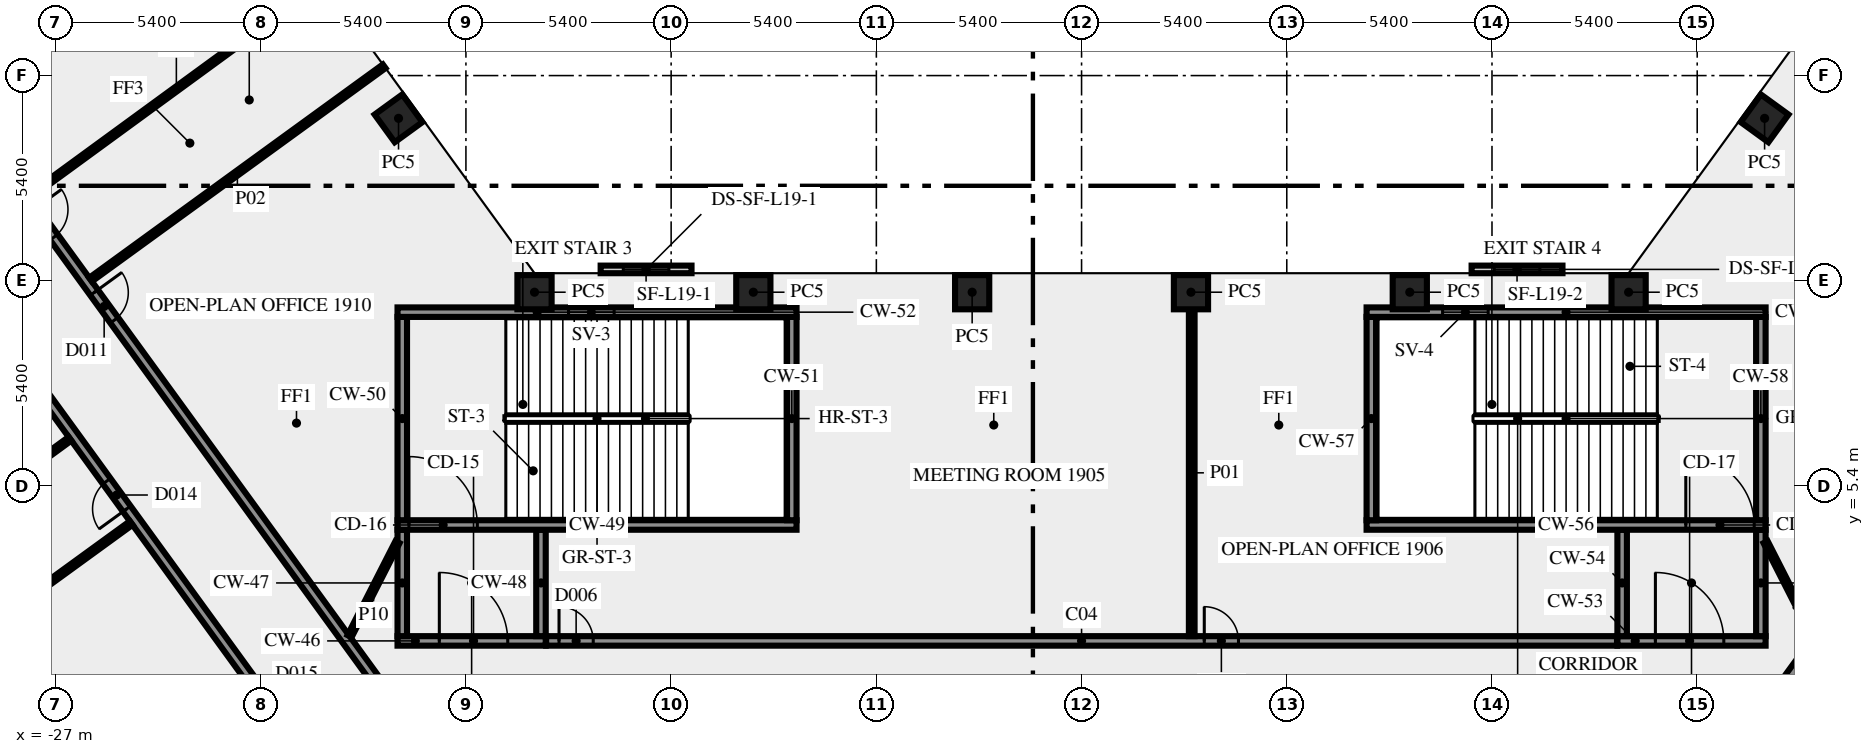
"""IFC4 building model, lengths in metres.
Left out: names, types, materials, properties, quantities, classifications, styles, units other than length and angle.
Written with IfcOpenShell. Run it as: python <this file> out.ifc"""

import sys

from ifc_helpers import new_model, si_unit, direction, frame, frame_2d, origin, origin_2d, place, context, subcontext, project, spatial, rectangle, extrude, element, fill, save


model = new_model("IFC4")
c1 = context("Model", 3, precision=1e-05, world=origin(), true_north=direction((0.0, 1.0)))
c2 = subcontext(c1, "Body", "Model", "MODEL_VIEW")
j1 = project(units=[si_unit("LENGTHUNIT", "METRE"), si_unit("PLANEANGLEUNIT", "RADIAN")], contexts=[c1])
p1 = place(None, origin())
s1 = spatial("IfcSite", under=j1, at=p1, CompositionType="ELEMENT")
p2 = place(p1, origin())
s2 = spatial("IfcBuilding", under=s1, at=p2, CompositionType="ELEMENT")
p3 = place(p2, frame((0.0, 0.0, 85.0)))
s3 = spatial("IfcBuildingStorey", under=s2, at=p3, CompositionType="ELEMENT", Elevation=85.0)
for number, where, z_axis, x_axis in (
    (1, (-17.974, 15.075, 0.0), (0.0, 0.0, 1.0), (-0.588, 0.809, 0.0)),
    (2, (17.974, 15.075, 0.0), (0.0, 0.0, 1.0), (-0.588, -0.809, 0.0)),
    (3, (14.395, 10.5, 0.0), (0.0, 0.0, 1.0), (-1.0, 0.0, 0.0)),
    (4, (8.637, 10.5, 0.0), (0.0, 0.0, 1.0), (-1.0, 0.0, 0.0)),
    (5, (2.879, 10.5, 0.0), (0.0, 0.0, 1.0), (-1.0, 0.0, 0.0)),
    (6, (-2.879, 10.5, 0.0), (0.0, 0.0, 1.0), (-1.0, 0.0, 0.0)),
    (7, (-8.637, 10.5, 0.0), (0.0, 0.0, 1.0), (-1.0, 0.0, 0.0)),
    (8, (-14.395, 10.5, 0.0), (0.0, 0.0, 1.0), (-1.0, 0.0, 0.0)),
):
    element("IfcColumn", number, at=place(p3, frame(where, z_axis=z_axis, x_axis=x_axis)), inside=s3, PredefinedType="COLUMN", context=c2, shape_type="SweptSolid", body=[
        extrude(rectangle(XDim=0.9, YDim=0.9, at=origin_2d()), origin(), (0.0, 0.0, 1.0), 3.65),
    ])
p4 = place(p3, frame((12.655, 11.1, 0.0), z_axis=(0.0, 0.0, 1.0), x_axis=(-1.0, 0.0, 0.0)))
e9 = element("IfcWall", 9, at=p4, inside=s3, PredefinedType="SOLIDWALL", context=c2, shape_type="SweptSolid", body=[
    extrude(rectangle(XDim=2.392, YDim=0.2, at=frame_2d((1.196, 0.0))), origin(), (0.0, 0.0, 1.0), 3.65),
])
p5 = place(p4, frame((0.596, 0.0, 1.0)))
e10 = element("IfcOpeningElement", 10, at=p5, cuts=e9, PredefinedType="OPENING", context=c2, shape_type="SweptSolid", body=[
    extrude(rectangle(XDim=1.2, YDim=1.2, at=frame_2d((0.6, 0.6))), frame((0.0, 0.11, 0.0), z_axis=(0.0, -1.0, 0.0), x_axis=(1.0, 0.0, 0.0)), (0.0, 0.0, 1.0), 0.22),
])
p6 = place(p3, frame((-10.263, 11.1, 0.0), z_axis=(0.0, 0.0, 1.0), x_axis=(-1.0, 0.0, 0.0)))
e11 = element("IfcWall", 11, at=p6, inside=s3, PredefinedType="SOLIDWALL", context=c2, shape_type="SweptSolid", body=[
    extrude(rectangle(XDim=2.392, YDim=0.2, at=frame_2d((1.196, 0.0))), origin(), (0.0, 0.0, 1.0), 3.65),
])
p7 = place(p6, frame((0.596, 0.0, 1.0)))
e12 = element("IfcOpeningElement", 12, at=p7, cuts=e11, PredefinedType="OPENING", context=c2, shape_type="SweptSolid", body=[
    extrude(rectangle(XDim=1.2, YDim=1.2, at=frame_2d((0.6, 0.6))), frame((0.0, 0.11, 0.0), z_axis=(0.0, -1.0, 0.0), x_axis=(1.0, 0.0, 0.0)), (0.0, 0.0, 1.0), 0.22),
])
p8 = place(p3, frame((-18.0, 1.325, 0.0), z_axis=(0.0, 0.0, 1.0), x_axis=(1.0, 0.0, 0.0)))
e13 = element("IfcWall", 13, at=p8, inside=s3, PredefinedType="SHEAR", context=c2, shape_type="SweptSolid", body=[
    extrude(rectangle(XDim=3.9, YDim=0.25, at=frame_2d((1.95, 0.0))), origin(), (0.0, 0.0, 1.0), 3.65),
])
p9 = place(p8, frame((1.1, 0.0, 0.0)))
e14 = element("IfcOpeningElement", 14, at=p9, cuts=e13, PredefinedType="OPENING", context=c2, shape_type="SweptSolid", body=[
    extrude(rectangle(XDim=1.8, YDim=2.1, at=frame_2d((0.9, 1.05))), frame((0.0, 0.135, 0.0), z_axis=(0.0, -1.0, 0.0), x_axis=(1.0, 0.0, 0.0)), (0.0, 0.0, 1.0), 0.27),
])
for number, where, z_axis, x_axis in (
    (15, (-17.875, 1.45, 0.0), (0.0, 0.0, 1.0), (0.0, 1.0, 0.0)),
    (16, (-14.225, 1.45, 0.0), (0.0, 0.0, 1.0), (0.0, 1.0, 0.0)),
):
    element("IfcWall", number, at=place(p3, frame(where, z_axis=z_axis, x_axis=x_axis)), inside=s3, PredefinedType="SHEAR", context=c2, shape_type="SweptSolid", body=[
        extrude(rectangle(XDim=2.8, YDim=0.25, at=frame_2d((1.4, 0.0))), origin(), (0.0, 0.0, 1.0), 3.65),
    ])
p10 = place(p3, frame((-18.0, 4.375, 0.0), z_axis=(0.0, 0.0, 1.0), x_axis=(1.0, 0.0, 0.0)))
e17 = element("IfcWall", 17, at=p10, inside=s3, PredefinedType="SHEAR", context=c2, shape_type="SweptSolid", body=[
    extrude(rectangle(XDim=10.5, YDim=0.25, at=frame_2d((5.25, 0.0))), origin(), (0.0, 0.0, 1.0), 3.65),
])
p11 = place(p10, frame((0.3, 0.0, 0.0)))
e18 = element("IfcOpeningElement", 18, at=p11, cuts=e17, PredefinedType="OPENING", context=c2, shape_type="SweptSolid", body=[
    extrude(rectangle(XDim=1.8, YDim=2.1, at=frame_2d((0.9, 1.05))), frame((0.0, 0.135, 0.0), z_axis=(0.0, -1.0, 0.0), x_axis=(1.0, 0.0, 0.0)), (0.0, 0.0, 1.0), 0.27),
])
for number, where, z_axis, x_axis in (
    (19, (-17.875, 4.5, 0.0), (0.0, 0.0, 1.0), (0.0, 1.0, 0.0)),
    (20, (-7.625, 4.5, 0.0), (0.0, 0.0, 1.0), (0.0, 1.0, 0.0)),
):
    element("IfcWall", number, at=place(p3, frame(where, z_axis=z_axis, x_axis=x_axis)), inside=s3, PredefinedType="SHEAR", context=c2, shape_type="SweptSolid", body=[
        extrude(rectangle(XDim=5.35, YDim=0.25, at=frame_2d((2.675, 0.0))), origin(), (0.0, 0.0, 1.0), 3.65),
    ])
p12 = place(p3, frame((-18.0, 9.975, 0.0), z_axis=(0.0, 0.0, 1.0), x_axis=(1.0, 0.0, 0.0)))
e21 = element("IfcWall", 21, at=p12, inside=s3, PredefinedType="SHEAR", context=c2, shape_type="SweptSolid", body=[
    extrude(rectangle(XDim=10.5, YDim=0.25, at=frame_2d((5.25, 0.0))), origin(), (0.0, 0.0, 1.0), 3.65),
])
p13 = place(p12, frame((4.5, 0.0, 1.0)))
e22 = element("IfcOpeningElement", 22, at=p13, cuts=e21, PredefinedType="OPENING", context=c2, shape_type="SweptSolid", body=[
    extrude(rectangle(XDim=1.2, YDim=1.2, at=frame_2d((0.6, 0.6))), frame((0.0, 0.135, 0.0), z_axis=(0.0, -1.0, 0.0), x_axis=(1.0, 0.0, 0.0)), (0.0, 0.0, 1.0), 0.27),
])
p14 = place(p3, frame((14.1, 1.325, 0.0), z_axis=(0.0, 0.0, 1.0), x_axis=(1.0, 0.0, 0.0)))
e23 = element("IfcWall", 23, at=p14, inside=s3, PredefinedType="SHEAR", context=c2, shape_type="SweptSolid", body=[
    extrude(rectangle(XDim=3.9, YDim=0.25, at=frame_2d((1.95, 0.0))), origin(), (0.0, 0.0, 1.0), 3.65),
])
p15 = place(p14, frame((1.0, 0.0, 0.0)))
e24 = element("IfcOpeningElement", 24, at=p15, cuts=e23, PredefinedType="OPENING", context=c2, shape_type="SweptSolid", body=[
    extrude(rectangle(XDim=1.8, YDim=2.1, at=frame_2d((0.9, 1.05))), frame((0.0, 0.135, 0.0), z_axis=(0.0, -1.0, 0.0), x_axis=(1.0, 0.0, 0.0)), (0.0, 0.0, 1.0), 0.27),
])
for number, where, z_axis, x_axis in (
    (25, (14.225, 1.45, 0.0), (0.0, 0.0, 1.0), (0.0, 1.0, 0.0)),
    (26, (17.875, 1.45, 0.0), (0.0, 0.0, 1.0), (0.0, 1.0, 0.0)),
):
    element("IfcWall", number, at=place(p3, frame(where, z_axis=z_axis, x_axis=x_axis)), inside=s3, PredefinedType="SHEAR", context=c2, shape_type="SweptSolid", body=[
        extrude(rectangle(XDim=2.8, YDim=0.25, at=frame_2d((1.4, 0.0))), origin(), (0.0, 0.0, 1.0), 3.65),
    ])
p16 = place(p3, frame((7.5, 4.375, 0.0), z_axis=(0.0, 0.0, 1.0), x_axis=(1.0, 0.0, 0.0)))
e27 = element("IfcWall", 27, at=p16, inside=s3, PredefinedType="SHEAR", context=c2, shape_type="SweptSolid", body=[
    extrude(rectangle(XDim=10.5, YDim=0.25, at=frame_2d((5.25, 0.0))), origin(), (0.0, 0.0, 1.0), 3.65),
])
p17 = place(p16, frame((8.4, 0.0, 0.0)))
e28 = element("IfcOpeningElement", 28, at=p17, cuts=e27, PredefinedType="OPENING", context=c2, shape_type="SweptSolid", body=[
    extrude(rectangle(XDim=1.8, YDim=2.1, at=frame_2d((0.9, 1.05))), frame((0.0, 0.135, 0.0), z_axis=(0.0, -1.0, 0.0), x_axis=(1.0, 0.0, 0.0)), (0.0, 0.0, 1.0), 0.27),
])
for number, where, z_axis, x_axis in (
    (29, (7.625, 4.5, 0.0), (0.0, 0.0, 1.0), (0.0, 1.0, 0.0)),
    (30, (17.875, 4.5, 0.0), (0.0, 0.0, 1.0), (0.0, 1.0, 0.0)),
):
    element("IfcWall", number, at=place(p3, frame(where, z_axis=z_axis, x_axis=x_axis)), inside=s3, PredefinedType="SHEAR", context=c2, shape_type="SweptSolid", body=[
        extrude(rectangle(XDim=5.35, YDim=0.25, at=frame_2d((2.675, 0.0))), origin(), (0.0, 0.0, 1.0), 3.65),
    ])
p18 = place(p3, frame((7.5, 9.975, 0.0), z_axis=(0.0, 0.0, 1.0), x_axis=(1.0, 0.0, 0.0)))
e31 = element("IfcWall", 31, at=p18, inside=s3, PredefinedType="SHEAR", context=c2, shape_type="SweptSolid", body=[
    extrude(rectangle(XDim=10.5, YDim=0.25, at=frame_2d((5.25, 0.0))), origin(), (0.0, 0.0, 1.0), 3.65),
])
p19 = place(p18, frame((2.0, 0.0, 1.0)))
e32 = element("IfcOpeningElement", 32, at=p19, cuts=e31, PredefinedType="OPENING", context=c2, shape_type="SweptSolid", body=[
    extrude(rectangle(XDim=1.2, YDim=1.2, at=frame_2d((0.6, 0.6))), frame((0.0, 0.135, 0.0), z_axis=(0.0, -1.0, 0.0), x_axis=(1.0, 0.0, 0.0)), (0.0, 0.0, 1.0), 0.27),
])
p20 = place(p3, frame((-20.531, -1.523, 0.0), z_axis=(0.0, 0.0, 1.0), x_axis=(-0.587784522481, 0.809017524614, 0.0)))
e33 = element("IfcWall", 33, at=p20, inside=s3, PredefinedType="SOLIDWALL", context=c2, shape_type="SweptSolid", body=[
    extrude(rectangle(XDim=49.912, YDim=0.25, at=frame_2d((24.956, 0.0))), origin(), (0.0, 0.0, 1.0), 3.65),
])
p21 = place(p20, frame((0.533, 0.0, 0.0)))
e34 = element("IfcOpeningElement", 34, at=p21, cuts=e33, PredefinedType="OPENING", context=c2, shape_type="SweptSolid", body=[
    extrude(rectangle(XDim=0.9, YDim=2.1, at=frame_2d((0.45, 1.05))), frame((0.0, 0.135, 0.0), z_axis=(0.0, -1.0, 0.0), x_axis=(1.0, 0.0, 0.0)), (0.0, 0.0, 1.0), 0.27),
])
p22 = place(p20, frame((48.47, 0.0, 0.0)))
e35 = element("IfcOpeningElement", 35, at=p22, cuts=e33, PredefinedType="OPENING", context=c2, shape_type="SweptSolid", body=[
    extrude(rectangle(XDim=1.0, YDim=2.1, at=frame_2d((0.5, 1.05))), frame((0.0, 0.135, 0.0), z_axis=(0.0, -1.0, 0.0), x_axis=(1.0, 0.0, 0.0)), (0.0, 0.0, 1.0), 0.27),
])
p23 = place(p20, frame((17.365, 0.0, 0.0)))
e36 = element("IfcOpeningElement", 36, at=p23, cuts=e33, PredefinedType="OPENING", context=c2, shape_type="SweptSolid", body=[
    extrude(rectangle(XDim=1.8, YDim=2.1, at=frame_2d((0.9, 1.05))), frame((0.0, 0.135, 0.0), z_axis=(0.0, -1.0, 0.0), x_axis=(1.0, 0.0, 0.0)), (0.0, 0.0, 1.0), 0.27),
])
p24 = place(p20, frame((7.816, 0.0, 0.0)))
e37 = element("IfcOpeningElement", 37, at=p24, cuts=e33, PredefinedType="OPENING", context=c2, shape_type="SweptSolid", body=[
    extrude(rectangle(XDim=0.9, YDim=2.1, at=frame_2d((0.45, 1.05))), frame((0.0, 0.135, 0.0), z_axis=(0.0, -1.0, 0.0), x_axis=(1.0, 0.0, 0.0)), (0.0, 0.0, 1.0), 0.27),
])
p25 = place(p3, frame((-37.232, 25.972, 0.0), z_axis=(0.0, 0.0, 1.0), x_axis=(0.587786323093, -0.809016216391, 0.0)))
e38 = element("IfcWall", 38, at=p25, inside=s3, PredefinedType="SOLIDWALL", context=c2, shape_type="SweptSolid", body=[
    extrude(rectangle(XDim=33.493, YDim=0.25, at=frame_2d((16.747, 0.0))), origin(), (0.0, 0.0, 1.0), 3.65),
])
p26 = place(p25, frame((19.135, 0.0, 0.0)))
e39 = element("IfcOpeningElement", 39, at=p26, cuts=e38, PredefinedType="OPENING", context=c2, shape_type="SweptSolid", body=[
    extrude(rectangle(XDim=0.9, YDim=2.1, at=frame_2d((0.45, 1.05))), frame((0.0, 0.135, 0.0), z_axis=(0.0, -1.0, 0.0), x_axis=(1.0, 0.0, 0.0)), (0.0, 0.0, 1.0), 0.27),
])
p27 = place(p25, frame((7.137, 0.0, 0.0)))
e40 = element("IfcOpeningElement", 40, at=p27, cuts=e38, PredefinedType="OPENING", context=c2, shape_type="SweptSolid", body=[
    extrude(rectangle(XDim=1.8, YDim=2.1, at=frame_2d((0.9, 1.05))), frame((0.0, 0.135, 0.0), z_axis=(0.0, -1.0, 0.0), x_axis=(1.0, 0.0, 0.0)), (0.0, 0.0, 1.0), 0.27),
])
p28 = place(p25, frame((16.435, 0.0, 0.0)))
e41 = element("IfcOpeningElement", 41, at=p28, cuts=e38, PredefinedType="OPENING", context=c2, shape_type="SweptSolid", body=[
    extrude(rectangle(XDim=0.9, YDim=2.1, at=frame_2d((0.45, 1.05))), frame((0.0, 0.135, 0.0), z_axis=(0.0, -1.0, 0.0), x_axis=(1.0, 0.0, 0.0)), (0.0, 0.0, 1.0), 0.27),
])
p29 = place(p3, frame((-14.09, 1.325, 0.0), z_axis=(0.0, 0.0, 1.0), x_axis=(1.0, 0.0, 0.0)))
e42 = element("IfcWall", 42, at=p29, inside=s3, PredefinedType="SOLIDWALL", context=c2, shape_type="SweptSolid", body=[
    extrude(rectangle(XDim=28.18, YDim=0.25, at=frame_2d((14.09, 0.0))), origin(), (0.0, 0.0, 1.0), 3.65),
])
p30 = place(p29, frame((17.319, 0.0, 0.0)))
e43 = element("IfcOpeningElement", 43, at=p30, cuts=e42, PredefinedType="OPENING", context=c2, shape_type="SweptSolid", body=[
    extrude(rectangle(XDim=0.9, YDim=2.1, at=frame_2d((0.45, 1.05))), frame((0.0, 0.135, 0.0), z_axis=(0.0, -1.0, 0.0), x_axis=(1.0, 0.0, 0.0)), (0.0, 0.0, 1.0), 0.27),
])
p31 = place(p29, frame((0.34, 0.0, 0.0)))
e44 = element("IfcOpeningElement", 44, at=p31, cuts=e42, PredefinedType="OPENING", context=c2, shape_type="SweptSolid", body=[
    extrude(rectangle(XDim=0.9, YDim=2.1, at=frame_2d((0.45, 1.05))), frame((0.0, 0.135, 0.0), z_axis=(0.0, -1.0, 0.0), x_axis=(1.0, 0.0, 0.0)), (0.0, 0.0, 1.0), 0.27),
])
p32 = place(p3, frame((17.545, -1.125, 0.0), z_axis=(0.0, 0.0, 1.0), x_axis=(0.587786330937, 0.809016210693, 0.0)))
e45 = element("IfcWall", 45, at=p32, inside=s3, PredefinedType="SOLIDWALL", context=c2, shape_type="SweptSolid", body=[
    extrude(rectangle(XDim=30.103, YDim=0.25, at=frame_2d((15.052, 0.0))), origin(), (0.0, 0.0, 1.0), 3.65),
])
p33 = place(p32, frame((28.679, 0.0, 0.0)))
e46 = element("IfcOpeningElement", 46, at=p33, cuts=e45, PredefinedType="OPENING", context=c2, shape_type="SweptSolid", body=[
    extrude(rectangle(XDim=1.0, YDim=2.1, at=frame_2d((0.5, 1.05))), frame((0.0, 0.135, 0.0), z_axis=(0.0, -1.0, 0.0), x_axis=(1.0, 0.0, 0.0)), (0.0, 0.0, 1.0), 0.27),
])
p34 = place(p32, frame((3.391, 0.0, 0.0)))
e47 = element("IfcOpeningElement", 47, at=p34, cuts=e45, PredefinedType="OPENING", context=c2, shape_type="SweptSolid", body=[
    extrude(rectangle(XDim=1.0, YDim=2.1, at=frame_2d((0.5, 1.05))), frame((0.0, 0.135, 0.0), z_axis=(0.0, -1.0, 0.0), x_axis=(1.0, 0.0, 0.0)), (0.0, 0.0, 1.0), 0.27),
])
p35 = place(p3, frame((2.899, 10.045, 0.0), z_axis=(0.0, 0.0, 1.0), x_axis=(0.0, -1.0, 0.0)))
e48 = element("IfcWall", 48, at=p35, inside=s3, PredefinedType="PARTITIONING", context=c2, shape_type="SweptSolid", body=[
    extrude(rectangle(XDim=8.595, YDim=0.15, at=frame_2d((4.297, 0.0))), origin(), (0.0, 0.0, 1.0), 3.65),
])
p36 = place(p3, frame((-18.351, 16.445, 0.0), z_axis=(0.0, 0.0, 1.0), x_axis=(-0.809052142986, -0.587736871338, 0.0)))
e49 = element("IfcWall", 49, at=p36, inside=s3, PredefinedType="PARTITIONING", context=c2, shape_type="SweptSolid", body=[
    extrude(rectangle(XDim=9.55, YDim=0.12, at=frame_2d((4.775, 0.0))), origin(), (0.0, 0.0, 1.0), 2.75),
])
p37 = place(p3, frame((-25.008, 4.427, 0.0), z_axis=(0.0, 0.0, 1.0), x_axis=(-0.808994684961, -0.587815957341, 0.0)))
e50 = element("IfcWall", 50, at=p37, inside=s3, PredefinedType="PARTITIONING", context=c2, shape_type="SweptSolid", body=[
    extrude(rectangle(XDim=9.55, YDim=0.12, at=frame_2d((4.775, 0.0))), origin(), (0.0, 0.0, 1.0), 2.75),
])
for number, where, z_axis, x_axis in (
    (51, (-27.676, 13.032, 0.0), (0.0, 0.0, 1.0), (0.808, 0.59, 0.0)),
    (52, (-34.332, 1.011, 0.0), (0.0, 0.0, 1.0), (0.808, 0.59, 0.0)),
):
    element("IfcWall", number, at=place(p3, frame(where, z_axis=z_axis, x_axis=x_axis)), inside=s3, PredefinedType="PARTITIONING", context=c2, shape_type="SweptSolid", body=[
        extrude(rectangle(XDim=9.55, YDim=0.12, at=frame_2d((4.775, 0.0))), origin(), (0.0, 0.0, 1.0), 2.75),
    ])
for number, where, z_axis, x_axis in (
    (53, (-19.261, 1.45, 0.0), (0.0, 0.0, 1.0), (0.454, 0.891, 0.0)),
    (54, (18.0, 3.925, 0.0), (0.0, 0.0, 1.0), (0.454, -0.891, 0.0)),
):
    element("IfcWall", number, at=place(p3, frame(where, z_axis=z_axis, x_axis=x_axis)), inside=s3, PredefinedType="PARTITIONING", context=c2, shape_type="SweptSolid", body=[
        extrude(rectangle(XDim=2.778, YDim=0.12, at=frame_2d((1.389, 0.0))), origin(), (0.0, 0.0, 1.0), 3.65),
    ])
p38 = place(p5, origin())
e55 = element("IfcWindow", 55, at=p38, inside=s3, PartitioningType="SINGLE_PANEL", PredefinedType="WINDOW", context=c2, shape_type="SweptSolid", body=[
    extrude(rectangle(XDim=1.2, YDim=1.2, at=frame_2d((0.6, 0.6))), frame((0.0, 0.03, 0.0), z_axis=(0.0, -1.0, 0.0), x_axis=(1.0, 0.0, 0.0)), (0.0, 0.0, 1.0), 0.06),
])
fill(e10, e55)
p39 = place(p7, origin())
e56 = element("IfcWindow", 56, at=p39, inside=s3, PartitioningType="SINGLE_PANEL", PredefinedType="WINDOW", context=c2, shape_type="SweptSolid", body=[
    extrude(rectangle(XDim=1.2, YDim=1.2, at=frame_2d((0.6, 0.6))), frame((0.0, 0.03, 0.0), z_axis=(0.0, -1.0, 0.0), x_axis=(1.0, 0.0, 0.0)), (0.0, 0.0, 1.0), 0.06),
])
fill(e12, e56)
p40 = place(p9, origin())
e57 = element("IfcDoor", 57, at=p40, inside=s3, OperationType="DOUBLE_DOOR_SINGLE_SWING", PredefinedType="DOOR", context=c2, shape_type="SweptSolid", body=[
    extrude(rectangle(XDim=1.8, YDim=2.1, at=frame_2d((0.9, 1.05))), frame((0.0, 0.025, 0.0), z_axis=(0.0, -1.0, 0.0), x_axis=(1.0, 0.0, 0.0)), (0.0, 0.0, 1.0), 0.05),
])
fill(e14, e57)
p41 = place(p11, origin())
e58 = element("IfcDoor", 58, at=p41, inside=s3, OperationType="DOUBLE_DOOR_SINGLE_SWING", PredefinedType="DOOR", context=c2, shape_type="SweptSolid", body=[
    extrude(rectangle(XDim=1.8, YDim=2.1, at=frame_2d((0.9, 1.05))), frame((0.0, 0.025, 0.0), z_axis=(0.0, -1.0, 0.0), x_axis=(1.0, 0.0, 0.0)), (0.0, 0.0, 1.0), 0.05),
])
fill(e18, e58)
p42 = place(p13, origin())
e59 = element("IfcWindow", 59, at=p42, inside=s3, PartitioningType="SINGLE_PANEL", PredefinedType="WINDOW", context=c2, shape_type="SweptSolid", body=[
    extrude(rectangle(XDim=1.2, YDim=1.2, at=frame_2d((0.6, 0.6))), frame((0.0, 0.03, 0.0), z_axis=(0.0, -1.0, 0.0), x_axis=(1.0, 0.0, 0.0)), (0.0, 0.0, 1.0), 0.06),
])
fill(e22, e59)
p43 = place(p15, origin())
e60 = element("IfcDoor", 60, at=p43, inside=s3, OperationType="DOUBLE_DOOR_SINGLE_SWING", PredefinedType="DOOR", context=c2, shape_type="SweptSolid", body=[
    extrude(rectangle(XDim=1.8, YDim=2.1, at=frame_2d((0.9, 1.05))), frame((0.0, 0.025, 0.0), z_axis=(0.0, -1.0, 0.0), x_axis=(1.0, 0.0, 0.0)), (0.0, 0.0, 1.0), 0.05),
])
fill(e24, e60)
p44 = place(p17, origin())
e61 = element("IfcDoor", 61, at=p44, inside=s3, OperationType="DOUBLE_DOOR_SINGLE_SWING", PredefinedType="DOOR", context=c2, shape_type="SweptSolid", body=[
    extrude(rectangle(XDim=1.8, YDim=2.1, at=frame_2d((0.9, 1.05))), frame((0.0, 0.025, 0.0), z_axis=(0.0, -1.0, 0.0), x_axis=(1.0, 0.0, 0.0)), (0.0, 0.0, 1.0), 0.05),
])
fill(e28, e61)
p45 = place(p19, origin())
e62 = element("IfcWindow", 62, at=p45, inside=s3, PartitioningType="SINGLE_PANEL", PredefinedType="WINDOW", context=c2, shape_type="SweptSolid", body=[
    extrude(rectangle(XDim=1.2, YDim=1.2, at=frame_2d((0.6, 0.6))), frame((0.0, 0.03, 0.0), z_axis=(0.0, -1.0, 0.0), x_axis=(1.0, 0.0, 0.0)), (0.0, 0.0, 1.0), 0.06),
])
fill(e32, e62)
p46 = place(p30, origin())
e63 = element("IfcDoor", 63, at=p46, inside=s3, OperationType="SINGLE_SWING_LEFT", PredefinedType="DOOR", context=c2, shape_type="SweptSolid", body=[
    extrude(rectangle(XDim=0.9, YDim=2.1, at=frame_2d((0.45, 1.05))), frame((0.0, 0.025, 0.0), z_axis=(0.0, -1.0, 0.0), x_axis=(1.0, 0.0, 0.0)), (0.0, 0.0, 1.0), 0.05),
])
fill(e43, e63)
p47 = place(p26, origin())
e64 = element("IfcDoor", 64, at=p47, inside=s3, OperationType="SINGLE_SWING_LEFT", PredefinedType="DOOR", context=c2, shape_type="SweptSolid", body=[
    extrude(rectangle(XDim=0.9, YDim=2.1, at=frame_2d((0.45, 1.05))), frame((0.0, 0.025, 0.0), z_axis=(0.0, -1.0, 0.0), x_axis=(1.0, 0.0, 0.0)), (0.0, 0.0, 1.0), 0.05),
])
fill(e39, e64)
p48 = place(p31, origin())
e65 = element("IfcDoor", 65, at=p48, inside=s3, OperationType="SINGLE_SWING_LEFT", PredefinedType="DOOR", context=c2, shape_type="SweptSolid", body=[
    extrude(rectangle(XDim=0.9, YDim=2.1, at=frame_2d((0.45, 1.05))), frame((0.0, 0.025, 0.0), z_axis=(0.0, -1.0, 0.0), x_axis=(1.0, 0.0, 0.0)), (0.0, 0.0, 1.0), 0.05),
])
fill(e44, e65)
p49 = place(p28, origin())
e66 = element("IfcDoor", 66, at=p49, inside=s3, OperationType="SINGLE_SWING_LEFT", PredefinedType="DOOR", context=c2, shape_type="SweptSolid", body=[
    extrude(rectangle(XDim=0.9, YDim=2.1, at=frame_2d((0.45, 1.05))), frame((0.0, 0.025, 0.0), z_axis=(0.0, -1.0, 0.0), x_axis=(1.0, 0.0, 0.0)), (0.0, 0.0, 1.0), 0.05),
])
fill(e41, e66)
p50 = place(p24, origin())
e67 = element("IfcDoor", 67, at=p50, inside=s3, OperationType="SINGLE_SWING_LEFT", PredefinedType="DOOR", context=c2, shape_type="SweptSolid", body=[
    extrude(rectangle(XDim=0.9, YDim=2.1, at=frame_2d((0.45, 1.05))), frame((0.0, 0.025, 0.0), z_axis=(0.0, -1.0, 0.0), x_axis=(1.0, 0.0, 0.0)), (0.0, 0.0, 1.0), 0.05),
])
fill(e37, e67)
save(model, sys.argv[1])
